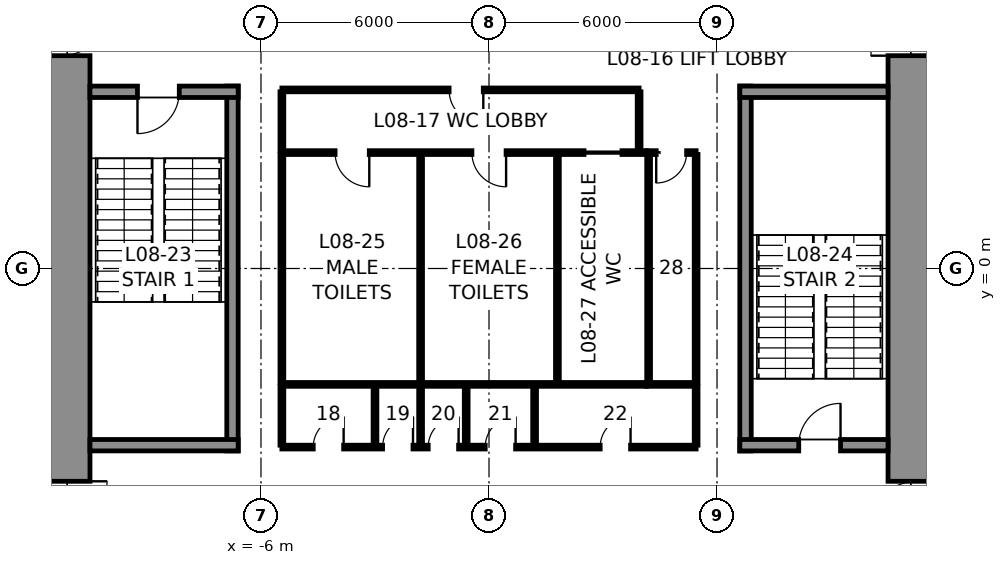
"""IFC4 building model, lengths in metres.
Left out: names, types, materials, properties, quantities, classifications, styles, units other than length and angle.
Written with IfcOpenShell. Run it as: python <this file> out.ifc"""

import sys

from ifc_helpers import new_model, si_unit, direction, frame, frame_2d, origin, place, context, subcontext, project, spatial, rectangle, extrude, element, fill, save


model = new_model("IFC4")
c1 = context("Model", 3, precision=1e-05, world=origin(), true_north=direction((0.0, 1.0)))
c2 = subcontext(c1, "Body", "Model", "MODEL_VIEW")
j1 = project(units=[si_unit("LENGTHUNIT", "METRE"), si_unit("PLANEANGLEUNIT", "RADIAN")], contexts=[c1])
p1 = place(None, origin())
s1 = spatial("IfcSite", under=j1, at=p1, CompositionType="ELEMENT")
p2 = place(p1, origin())
s2 = spatial("IfcBuilding", under=s1, at=p2, CompositionType="ELEMENT")
p3 = place(p2, frame((0.0, 0.0, 43.0)))
s3 = spatial("IfcBuildingStorey", under=s2, at=p3, CompositionType="ELEMENT", Elevation=43.0)
p4 = place(p3, frame((11.25, 10.5, 0.0), z_axis=(0.0, 0.0, 1.0), x_axis=(0.0, -1.0, 0.0)))
e1 = element("IfcWall", 1, at=p4, inside=s3, PredefinedType="SHEAR", context=c2, shape_type="SweptSolid", body=[
    extrude(rectangle(XDim=21.0, YDim=1.5, at=frame_2d((10.5, 0.0))), origin(), (0.0, 0.0, 1.0), 5.5),
])
p5 = place(p4, frame((3.7, 0.0, 0.0)))
e2 = element("IfcOpeningElement", 2, at=p5, cuts=e1, PredefinedType="OPENING", context=c2, shape_type="SweptSolid", body=[
    extrude(rectangle(XDim=1.2, YDim=2.3, at=frame_2d((0.6, 1.15))), frame((0.0, 0.76, 0.0), z_axis=(0.0, -1.0, 0.0), x_axis=(1.0, 0.0, 0.0)), (0.0, 0.0, 1.0), 1.52),
])
p6 = place(p4, frame((16.1, 0.0, 0.0)))
e3 = element("IfcOpeningElement", 3, at=p6, cuts=e1, PredefinedType="OPENING", context=c2, shape_type="SweptSolid", body=[
    extrude(rectangle(XDim=1.2, YDim=2.3, at=frame_2d((0.6, 1.15))), frame((0.0, 0.76, 0.0), z_axis=(0.0, -1.0, 0.0), x_axis=(1.0, 0.0, 0.0)), (0.0, 0.0, 1.0), 1.52),
])
p7 = place(p3, frame((-11.25, -10.5, 0.0), z_axis=(0.0, 0.0, 1.0), x_axis=(0.0, 1.0, 0.0)))
e4 = element("IfcWall", 4, at=p7, inside=s3, PredefinedType="SHEAR", context=c2, shape_type="SweptSolid", body=[
    extrude(rectangle(XDim=21.0, YDim=1.5, at=frame_2d((10.5, 0.0))), origin(), (0.0, 0.0, 1.0), 5.5),
])
p8 = place(p7, frame((16.1, 0.0, 0.0)))
e5 = element("IfcOpeningElement", 5, at=p8, cuts=e4, PredefinedType="OPENING", context=c2, shape_type="SweptSolid", body=[
    extrude(rectangle(XDim=1.2, YDim=2.3, at=frame_2d((0.6, 1.15))), frame((0.0, 0.76, 0.0), z_axis=(0.0, -1.0, 0.0), x_axis=(1.0, 0.0, 0.0)), (0.0, 0.0, 1.0), 1.52),
])
p9 = place(p7, frame((3.7, 0.0, 0.0)))
e6 = element("IfcOpeningElement", 6, at=p9, cuts=e4, PredefinedType="OPENING", context=c2, shape_type="SweptSolid", body=[
    extrude(rectangle(XDim=1.2, YDim=2.3, at=frame_2d((0.6, 1.15))), frame((0.0, 0.76, 0.0), z_axis=(0.0, -1.0, 0.0), x_axis=(1.0, 0.0, 0.0)), (0.0, 0.0, 1.0), 1.52),
])
p10 = place(p3, frame((-6.75, -4.8, 0.0), z_axis=(0.0, 0.0, 1.0), x_axis=(0.0, 1.0, 0.0)))
e7 = element("IfcWall", 7, at=p10, inside=s3, PredefinedType="SOLIDWALL", context=c2, shape_type="SweptSolid", body=[
    extrude(rectangle(XDim=9.6, YDim=0.3, at=frame_2d((4.8, 0.0))), origin(), (0.0, 0.0, 1.0), 5.25),
])
p11 = place(p3, frame((-10.5, 4.65, 0.0), z_axis=(0.0, 0.0, 1.0), x_axis=(1.0, 0.0, 0.0)))
e8 = element("IfcWall", 8, at=p11, inside=s3, PredefinedType="SOLIDWALL", context=c2, shape_type="SweptSolid", body=[
    extrude(rectangle(XDim=3.9, YDim=0.3, at=frame_2d((1.95, 0.0))), origin(), (0.0, 0.0, 1.0), 5.25),
])
p12 = place(p11, frame((1.25, 0.0, 0.0)))
e9 = element("IfcOpeningElement", 9, at=p12, cuts=e8, PredefinedType="OPENING", context=c2, shape_type="SweptSolid", body=[
    extrude(rectangle(XDim=1.1, YDim=2.3, at=frame_2d((0.55, 1.15))), frame((0.0, 0.16, 0.0), z_axis=(0.0, -1.0, 0.0), x_axis=(1.0, 0.0, 0.0)), (0.0, 0.0, 1.0), 0.32),
])
p13 = place(p3, frame((-6.6, -4.65, 0.0), z_axis=(0.0, 0.0, 1.0), x_axis=(-1.0, 0.0, 0.0)))
e10 = element("IfcWall", 10, at=p13, inside=s3, PredefinedType="SOLIDWALL", context=c2, shape_type="SweptSolid", body=[
    extrude(rectangle(XDim=3.9, YDim=0.3, at=frame_2d((1.95, 0.0))), origin(), (0.0, 0.0, 1.0), 5.25),
])
p14 = place(p3, frame((6.75, -4.8, 0.0), z_axis=(0.0, 0.0, 1.0), x_axis=(0.0, 1.0, 0.0)))
e11 = element("IfcWall", 11, at=p14, inside=s3, PredefinedType="SOLIDWALL", context=c2, shape_type="SweptSolid", body=[
    extrude(rectangle(XDim=9.6, YDim=0.3, at=frame_2d((4.8, 0.0))), origin(), (0.0, 0.0, 1.0), 5.25),
])
p15 = place(p3, frame((6.6, 4.65, 0.0), z_axis=(0.0, 0.0, 1.0), x_axis=(1.0, 0.0, 0.0)))
e12 = element("IfcWall", 12, at=p15, inside=s3, PredefinedType="SOLIDWALL", context=c2, shape_type="SweptSolid", body=[
    extrude(rectangle(XDim=3.9, YDim=0.3, at=frame_2d((1.95, 0.0))), origin(), (0.0, 0.0, 1.0), 5.25),
])
p16 = place(p3, frame((10.5, -4.65, 0.0), z_axis=(0.0, 0.0, 1.0), x_axis=(-1.0, 0.0, 0.0)))
e13 = element("IfcWall", 13, at=p16, inside=s3, PredefinedType="SOLIDWALL", context=c2, shape_type="SweptSolid", body=[
    extrude(rectangle(XDim=3.9, YDim=0.3, at=frame_2d((1.95, 0.0))), origin(), (0.0, 0.0, 1.0), 5.25),
])
p17 = place(p16, frame((1.25, 0.0, 0.0)))
e14 = element("IfcOpeningElement", 14, at=p17, cuts=e13, PredefinedType="OPENING", context=c2, shape_type="SweptSolid", body=[
    extrude(rectangle(XDim=1.1, YDim=2.3, at=frame_2d((0.55, 1.15))), frame((0.0, 0.16, 0.0), z_axis=(0.0, -1.0, 0.0), x_axis=(1.0, 0.0, 0.0)), (0.0, 0.0, 1.0), 0.32),
])
p18 = place(p3, frame((-5.45, 3.05, 0.0), z_axis=(0.0, 0.0, 1.0), x_axis=(1.0, 0.0, 0.0)))
e15 = element("IfcWall", 15, at=p18, inside=s3, PredefinedType="PARTITIONING", context=c2, shape_type="SweptSolid", body=[
    extrude(rectangle(XDim=9.6, YDim=0.1, at=frame_2d((4.8, 0.0))), origin(), (0.0, 0.0, 1.0), 5.25),
])
p19 = place(p18, frame((1.4, 0.0, 0.0)))
e16 = element("IfcOpeningElement", 16, at=p19, cuts=e15, PredefinedType="OPENING", context=c2, shape_type="SweptSolid", body=[
    extrude(rectangle(XDim=0.9, YDim=2.3, at=frame_2d((0.45, 1.15))), frame((0.0, 0.06, 0.0), z_axis=(0.0, -1.0, 0.0), x_axis=(1.0, 0.0, 0.0)), (0.0, 0.0, 1.0), 0.12),
])
p20 = place(p18, frame((5.0, 0.0, 0.0)))
e17 = element("IfcOpeningElement", 17, at=p20, cuts=e15, PredefinedType="OPENING", context=c2, shape_type="SweptSolid", body=[
    extrude(rectangle(XDim=0.9, YDim=2.3, at=frame_2d((0.45, 1.15))), frame((0.0, 0.06, 0.0), z_axis=(0.0, -1.0, 0.0), x_axis=(1.0, 0.0, 0.0)), (0.0, 0.0, 1.0), 0.12),
])
p21 = place(p18, frame((7.95, 0.0, 0.0)))
e18 = element("IfcOpeningElement", 18, at=p21, cuts=e15, PredefinedType="OPENING", context=c2, shape_type="SweptSolid", body=[
    extrude(rectangle(XDim=1.0, YDim=2.3, at=frame_2d((0.5, 1.15))), frame((0.0, 0.06, 0.0), z_axis=(0.0, -1.0, 0.0), x_axis=(1.0, 0.0, 0.0)), (0.0, 0.0, 1.0), 0.12),
])
p22 = place(p3, frame((4.15, 3.05, 0.0), z_axis=(0.0, 0.0, 1.0), x_axis=(1.0, 0.0, 0.0)))
e19 = element("IfcWall", 19, at=p22, inside=s3, PredefinedType="PARTITIONING", context=c2, shape_type="SweptSolid", body=[
    extrude(rectangle(XDim=1.3, YDim=0.1, at=frame_2d((0.65, 0.0))), origin(), (0.0, 0.0, 1.0), 5.25),
])
p23 = place(p22, frame((0.25, 0.0, 0.0)))
e20 = element("IfcOpeningElement", 20, at=p23, cuts=e19, PredefinedType="OPENING", context=c2, shape_type="SweptSolid", body=[
    extrude(rectangle(XDim=0.8, YDim=2.3, at=frame_2d((0.4, 1.15))), frame((0.0, 0.06, 0.0), z_axis=(0.0, -1.0, 0.0), x_axis=(1.0, 0.0, 0.0)), (0.0, 0.0, 1.0), 0.12),
])
p24 = place(p3, frame((4.15, -3.05, 0.0), z_axis=(0.0, 0.0, 1.0), x_axis=(-1.0, 0.0, 0.0)))
e21 = element("IfcWall", 21, at=p24, inside=s3, PredefinedType="PARTITIONING", context=c2, shape_type="SweptSolid", body=[
    extrude(rectangle(XDim=9.6, YDim=0.1, at=frame_2d((4.8, 0.0))), origin(), (0.0, 0.0, 1.0), 5.25),
])
p25 = place(p3, frame((5.45, -3.05, 0.0), z_axis=(0.0, 0.0, 1.0), x_axis=(-1.0, 0.0, 0.0)))
e22 = element("IfcWall", 22, at=p25, inside=s3, PredefinedType="PARTITIONING", context=c2, shape_type="SweptSolid", body=[
    extrude(rectangle(XDim=1.3, YDim=0.1, at=frame_2d((0.65, 0.0))), origin(), (0.0, 0.0, 1.0), 5.25),
])
for number, where, z_axis, x_axis in (
    (23, (5.45, 3.0, 0.0), (0.0, 0.0, 1.0), (0.0, -1.0, 0.0)),
    (24, (-5.45, -3.0, 0.0), (0.0, 0.0, 1.0), (0.0, 1.0, 0.0)),
    (25, (-1.8, -3.0, 0.0), (0.0, 0.0, 1.0), (0.0, 1.0, 0.0)),
    (26, (1.8, -3.0, 0.0), (0.0, 0.0, 1.0), (0.0, 1.0, 0.0)),
    (27, (4.2, -3.0, 0.0), (0.0, 0.0, 1.0), (0.0, 1.0, 0.0)),
):
    element("IfcWall", number, at=place(p3, frame(where, z_axis=z_axis, x_axis=x_axis)), inside=s3, PredefinedType="PARTITIONING", context=c2, shape_type="SweptSolid", body=[
        extrude(rectangle(XDim=6.0, YDim=0.1, at=frame_2d((3.0, 0.0))), origin(), (0.0, 0.0, 1.0), 5.25),
    ])
p26 = place(p3, frame((-5.45, 4.7, 0.0), z_axis=(0.0, 0.0, 1.0), x_axis=(1.0, 0.0, 0.0)))
e28 = element("IfcWall", 28, at=p26, inside=s3, PredefinedType="PARTITIONING", context=c2, shape_type="SweptSolid", body=[
    extrude(rectangle(XDim=9.4, YDim=0.1, at=frame_2d((4.7, 0.0))), origin(), (0.0, 0.0, 1.0), 5.25),
])
p27 = place(p26, frame((4.4, 0.0, 0.0)))
e29 = element("IfcOpeningElement", 29, at=p27, cuts=e28, PredefinedType="OPENING", context=c2, shape_type="SweptSolid", body=[
    extrude(rectangle(XDim=0.9, YDim=2.3, at=frame_2d((0.45, 1.15))), frame((0.0, 0.06, 0.0), z_axis=(0.0, -1.0, 0.0), x_axis=(1.0, 0.0, 0.0)), (0.0, 0.0, 1.0), 0.12),
])
for number, where, z_axis, x_axis in (
    (30, (-5.45, 3.1, 0.0), (0.0, 0.0, 1.0), (0.0, 1.0, 0.0)),
    (31, (3.95, 3.1, 0.0), (0.0, 0.0, 1.0), (0.0, 1.0, 0.0)),
):
    element("IfcWall", number, at=place(p3, frame(where, z_axis=z_axis, x_axis=x_axis)), inside=s3, PredefinedType="PARTITIONING", context=c2, shape_type="SweptSolid", body=[
        extrude(rectangle(XDim=1.55, YDim=0.1, at=frame_2d((0.775, 0.0))), origin(), (0.0, 0.0, 1.0), 5.25),
    ])
p28 = place(p3, frame((5.45, -4.7, 0.0), z_axis=(0.0, 0.0, 1.0), x_axis=(-1.0, 0.0, 0.0)))
e32 = element("IfcWall", 32, at=p28, inside=s3, PredefinedType="PARTITIONING", context=c2, shape_type="SweptSolid", body=[
    extrude(rectangle(XDim=10.9, YDim=0.1, at=frame_2d((5.45, 0.0))), origin(), (0.0, 0.0, 1.0), 5.25),
])
p29 = place(p28, frame((9.275, 0.0, 0.0)))
e33 = element("IfcOpeningElement", 33, at=p29, cuts=e32, PredefinedType="OPENING", context=c2, shape_type="SweptSolid", body=[
    extrude(rectangle(XDim=0.8, YDim=2.3, at=frame_2d((0.4, 1.15))), frame((0.0, 0.06, 0.0), z_axis=(0.0, -1.0, 0.0), x_axis=(1.0, 0.0, 0.0)), (0.0, 0.0, 1.0), 0.12),
])
p30 = place(p28, frame((7.45, 0.0, 0.0)))
e34 = element("IfcOpeningElement", 34, at=p30, cuts=e32, PredefinedType="OPENING", context=c2, shape_type="SweptSolid", body=[
    extrude(rectangle(XDim=0.8, YDim=2.3, at=frame_2d((0.4, 1.15))), frame((0.0, 0.06, 0.0), z_axis=(0.0, -1.0, 0.0), x_axis=(1.0, 0.0, 0.0)), (0.0, 0.0, 1.0), 0.12),
])
p31 = place(p28, frame((6.25, 0.0, 0.0)))
e35 = element("IfcOpeningElement", 35, at=p31, cuts=e32, PredefinedType="OPENING", context=c2, shape_type="SweptSolid", body=[
    extrude(rectangle(XDim=0.8, YDim=2.3, at=frame_2d((0.4, 1.15))), frame((0.0, 0.06, 0.0), z_axis=(0.0, -1.0, 0.0), x_axis=(1.0, 0.0, 0.0)), (0.0, 0.0, 1.0), 0.12),
])
p32 = place(p28, frame((4.75, 0.0, 0.0)))
e36 = element("IfcOpeningElement", 36, at=p32, cuts=e32, PredefinedType="OPENING", context=c2, shape_type="SweptSolid", body=[
    extrude(rectangle(XDim=0.8, YDim=2.3, at=frame_2d((0.4, 1.15))), frame((0.0, 0.06, 0.0), z_axis=(0.0, -1.0, 0.0), x_axis=(1.0, 0.0, 0.0)), (0.0, 0.0, 1.0), 0.12),
])
p33 = place(p28, frame((1.725, 0.0, 0.0)))
e37 = element("IfcOpeningElement", 37, at=p33, cuts=e32, PredefinedType="OPENING", context=c2, shape_type="SweptSolid", body=[
    extrude(rectangle(XDim=0.8, YDim=2.3, at=frame_2d((0.4, 1.15))), frame((0.0, 0.06, 0.0), z_axis=(0.0, -1.0, 0.0), x_axis=(1.0, 0.0, 0.0)), (0.0, 0.0, 1.0), 0.12),
])
for number, where, z_axis, x_axis in (
    (38, (-5.45, -3.1, 0.0), (0.0, 0.0, 1.0), (0.0, -1.0, 0.0)),
    (39, (5.45, -3.1, 0.0), (0.0, 0.0, 1.0), (0.0, -1.0, 0.0)),
    (40, (-3.0, -3.1, 0.0), (0.0, 0.0, 1.0), (0.0, -1.0, 0.0)),
    (41, (-1.8, -3.1, 0.0), (0.0, 0.0, 1.0), (0.0, -1.0, 0.0)),
    (42, (-0.6, -3.1, 0.0), (0.0, 0.0, 1.0), (0.0, -1.0, 0.0)),
    (43, (1.2, -3.1, 0.0), (0.0, 0.0, 1.0), (0.0, -1.0, 0.0)),
):
    element("IfcWall", number, at=place(p3, frame(where, z_axis=z_axis, x_axis=x_axis)), inside=s3, PredefinedType="PARTITIONING", context=c2, shape_type="SweptSolid", body=[
        extrude(rectangle(XDim=1.55, YDim=0.1, at=frame_2d((0.775, 0.0))), origin(), (0.0, 0.0, 1.0), 5.25),
    ])
p34 = place(p12, frame((1.1, 0.0, 0.0), z_axis=(0.0, 0.0, 1.0), x_axis=(-1.0, 0.0, 0.0)))
e44 = element("IfcDoor", 44, at=p34, inside=s3, OperationType="SINGLE_SWING_RIGHT", PredefinedType="DOOR", context=c2, shape_type="SweptSolid", body=[
    extrude(rectangle(XDim=1.1, YDim=2.3, at=frame_2d((0.55, 1.15))), frame((0.0, 0.025, 0.0), z_axis=(0.0, -1.0, 0.0), x_axis=(1.0, 0.0, 0.0)), (0.0, 0.0, 1.0), 0.05),
])
fill(e9, e44)
p35 = place(p17, frame((1.1, 0.0, 0.0), z_axis=(0.0, 0.0, 1.0), x_axis=(-1.0, 0.0, 0.0)))
e45 = element("IfcDoor", 45, at=p35, inside=s3, OperationType="SINGLE_SWING_RIGHT", PredefinedType="DOOR", context=c2, shape_type="SweptSolid", body=[
    extrude(rectangle(XDim=1.1, YDim=2.3, at=frame_2d((0.55, 1.15))), frame((0.0, 0.025, 0.0), z_axis=(0.0, -1.0, 0.0), x_axis=(1.0, 0.0, 0.0)), (0.0, 0.0, 1.0), 0.05),
])
fill(e14, e45)
p36 = place(p19, frame((0.9, 0.0, 0.0), z_axis=(0.0, 0.0, 1.0), x_axis=(-1.0, 0.0, 0.0)))
e46 = element("IfcDoor", 46, at=p36, inside=s3, OperationType="SINGLE_SWING_LEFT", PredefinedType="DOOR", context=c2, shape_type="SweptSolid", body=[
    extrude(rectangle(XDim=0.9, YDim=2.3, at=frame_2d((0.45, 1.15))), frame((0.0, 0.025, 0.0), z_axis=(0.0, -1.0, 0.0), x_axis=(1.0, 0.0, 0.0)), (0.0, 0.0, 1.0), 0.05),
])
fill(e16, e46)
p37 = place(p20, frame((0.9, 0.0, 0.0), z_axis=(0.0, 0.0, 1.0), x_axis=(-1.0, 0.0, 0.0)))
e47 = element("IfcDoor", 47, at=p37, inside=s3, OperationType="SINGLE_SWING_LEFT", PredefinedType="DOOR", context=c2, shape_type="SweptSolid", body=[
    extrude(rectangle(XDim=0.9, YDim=2.3, at=frame_2d((0.45, 1.15))), frame((0.0, 0.025, 0.0), z_axis=(0.0, -1.0, 0.0), x_axis=(1.0, 0.0, 0.0)), (0.0, 0.0, 1.0), 0.05),
])
fill(e17, e47)
p38 = place(p21, frame((1.0, 0.0, 0.0), z_axis=(0.0, 0.0, 1.0), x_axis=(-1.0, 0.0, 0.0)))
e48 = element("IfcDoor", 48, at=p38, inside=s3, OperationType="SLIDING_TO_LEFT", PredefinedType="DOOR", context=c2, shape_type="SweptSolid", body=[
    extrude(rectangle(XDim=1.0, YDim=2.3, at=frame_2d((0.5, 1.15))), frame((0.0, 0.025, 0.0), z_axis=(0.0, -1.0, 0.0), x_axis=(1.0, 0.0, 0.0)), (0.0, 0.0, 1.0), 0.05),
])
fill(e18, e48)
p39 = place(p23, frame((0.8, 0.0, 0.0), z_axis=(0.0, 0.0, 1.0), x_axis=(-1.0, 0.0, 0.0)))
e49 = element("IfcDoor", 49, at=p39, inside=s3, OperationType="SINGLE_SWING_RIGHT", PredefinedType="DOOR", context=c2, shape_type="SweptSolid", body=[
    extrude(rectangle(XDim=0.8, YDim=2.3, at=frame_2d((0.4, 1.15))), frame((0.0, 0.025, 0.0), z_axis=(0.0, -1.0, 0.0), x_axis=(1.0, 0.0, 0.0)), (0.0, 0.0, 1.0), 0.05),
])
fill(e20, e49)
p40 = place(p27, frame((0.9, 0.0, 0.0), z_axis=(0.0, 0.0, 1.0), x_axis=(-1.0, 0.0, 0.0)))
e50 = element("IfcDoor", 50, at=p40, inside=s3, OperationType="SINGLE_SWING_LEFT", PredefinedType="DOOR", context=c2, shape_type="SweptSolid", body=[
    extrude(rectangle(XDim=0.9, YDim=2.3, at=frame_2d((0.45, 1.15))), frame((0.0, 0.025, 0.0), z_axis=(0.0, -1.0, 0.0), x_axis=(1.0, 0.0, 0.0)), (0.0, 0.0, 1.0), 0.05),
])
fill(e29, e50)
p41 = place(p29, frame((0.8, 0.0, 0.0), z_axis=(0.0, 0.0, 1.0), x_axis=(-1.0, 0.0, 0.0)))
e51 = element("IfcDoor", 51, at=p41, inside=s3, OperationType="SINGLE_SWING_RIGHT", PredefinedType="DOOR", context=c2, shape_type="SweptSolid", body=[
    extrude(rectangle(XDim=0.8, YDim=2.3, at=frame_2d((0.4, 1.15))), frame((0.0, 0.025, 0.0), z_axis=(0.0, -1.0, 0.0), x_axis=(1.0, 0.0, 0.0)), (0.0, 0.0, 1.0), 0.05),
])
fill(e33, e51)
p42 = place(p30, frame((0.8, 0.0, 0.0), z_axis=(0.0, 0.0, 1.0), x_axis=(-1.0, 0.0, 0.0)))
e52 = element("IfcDoor", 52, at=p42, inside=s3, OperationType="SINGLE_SWING_RIGHT", PredefinedType="DOOR", context=c2, shape_type="SweptSolid", body=[
    extrude(rectangle(XDim=0.8, YDim=2.3, at=frame_2d((0.4, 1.15))), frame((0.0, 0.025, 0.0), z_axis=(0.0, -1.0, 0.0), x_axis=(1.0, 0.0, 0.0)), (0.0, 0.0, 1.0), 0.05),
])
fill(e34, e52)
p43 = place(p31, frame((0.8, 0.0, 0.0), z_axis=(0.0, 0.0, 1.0), x_axis=(-1.0, 0.0, 0.0)))
e53 = element("IfcDoor", 53, at=p43, inside=s3, OperationType="SINGLE_SWING_RIGHT", PredefinedType="DOOR", context=c2, shape_type="SweptSolid", body=[
    extrude(rectangle(XDim=0.8, YDim=2.3, at=frame_2d((0.4, 1.15))), frame((0.0, 0.025, 0.0), z_axis=(0.0, -1.0, 0.0), x_axis=(1.0, 0.0, 0.0)), (0.0, 0.0, 1.0), 0.05),
])
fill(e35, e53)
p44 = place(p32, frame((0.8, 0.0, 0.0), z_axis=(0.0, 0.0, 1.0), x_axis=(-1.0, 0.0, 0.0)))
e54 = element("IfcDoor", 54, at=p44, inside=s3, OperationType="SINGLE_SWING_RIGHT", PredefinedType="DOOR", context=c2, shape_type="SweptSolid", body=[
    extrude(rectangle(XDim=0.8, YDim=2.3, at=frame_2d((0.4, 1.15))), frame((0.0, 0.025, 0.0), z_axis=(0.0, -1.0, 0.0), x_axis=(1.0, 0.0, 0.0)), (0.0, 0.0, 1.0), 0.05),
])
fill(e36, e54)
p45 = place(p33, frame((0.8, 0.0, 0.0), z_axis=(0.0, 0.0, 1.0), x_axis=(-1.0, 0.0, 0.0)))
e55 = element("IfcDoor", 55, at=p45, inside=s3, OperationType="SINGLE_SWING_RIGHT", PredefinedType="DOOR", context=c2, shape_type="SweptSolid", body=[
    extrude(rectangle(XDim=0.8, YDim=2.3, at=frame_2d((0.4, 1.15))), frame((0.0, 0.025, 0.0), z_axis=(0.0, -1.0, 0.0), x_axis=(1.0, 0.0, 0.0)), (0.0, 0.0, 1.0), 0.05),
])
fill(e37, e55)
p46 = place(p8, frame((1.2, 0.0, 0.0), z_axis=(0.0, 0.0, 1.0), x_axis=(-1.0, 0.0, 0.0)))
e56 = element("IfcDoor", 56, at=p46, inside=s3, OperationType="SINGLE_SWING_LEFT", PredefinedType="DOOR", context=c2, shape_type="SweptSolid", body=[
    extrude(rectangle(XDim=1.2, YDim=2.3, at=frame_2d((0.6, 1.15))), frame((0.0, 0.025, 0.0), z_axis=(0.0, -1.0, 0.0), x_axis=(1.0, 0.0, 0.0)), (0.0, 0.0, 1.0), 0.05),
])
fill(e5, e56)
p47 = place(p9, frame((1.2, 0.0, 0.0), z_axis=(0.0, 0.0, 1.0), x_axis=(-1.0, 0.0, 0.0)))
e57 = element("IfcDoor", 57, at=p47, inside=s3, OperationType="SINGLE_SWING_LEFT", PredefinedType="DOOR", context=c2, shape_type="SweptSolid", body=[
    extrude(rectangle(XDim=1.2, YDim=2.3, at=frame_2d((0.6, 1.15))), frame((0.0, 0.025, 0.0), z_axis=(0.0, -1.0, 0.0), x_axis=(1.0, 0.0, 0.0)), (0.0, 0.0, 1.0), 0.05),
])
fill(e6, e57)
p48 = place(p5, frame((1.2, 0.0, 0.0), z_axis=(0.0, 0.0, 1.0), x_axis=(-1.0, 0.0, 0.0)))
e58 = element("IfcDoor", 58, at=p48, inside=s3, OperationType="SINGLE_SWING_LEFT", PredefinedType="DOOR", context=c2, shape_type="SweptSolid", body=[
    extrude(rectangle(XDim=1.2, YDim=2.3, at=frame_2d((0.6, 1.15))), frame((0.0, 0.025, 0.0), z_axis=(0.0, -1.0, 0.0), x_axis=(1.0, 0.0, 0.0)), (0.0, 0.0, 1.0), 0.05),
])
fill(e2, e58)
p49 = place(p6, frame((1.2, 0.0, 0.0), z_axis=(0.0, 0.0, 1.0), x_axis=(-1.0, 0.0, 0.0)))
e59 = element("IfcDoor", 59, at=p49, inside=s3, OperationType="SINGLE_SWING_LEFT", PredefinedType="DOOR", context=c2, shape_type="SweptSolid", body=[
    extrude(rectangle(XDim=1.2, YDim=2.3, at=frame_2d((0.6, 1.15))), frame((0.0, 0.025, 0.0), z_axis=(0.0, -1.0, 0.0), x_axis=(1.0, 0.0, 0.0)), (0.0, 0.0, 1.0), 0.05),
])
fill(e3, e59)
save(model, sys.argv[1])
